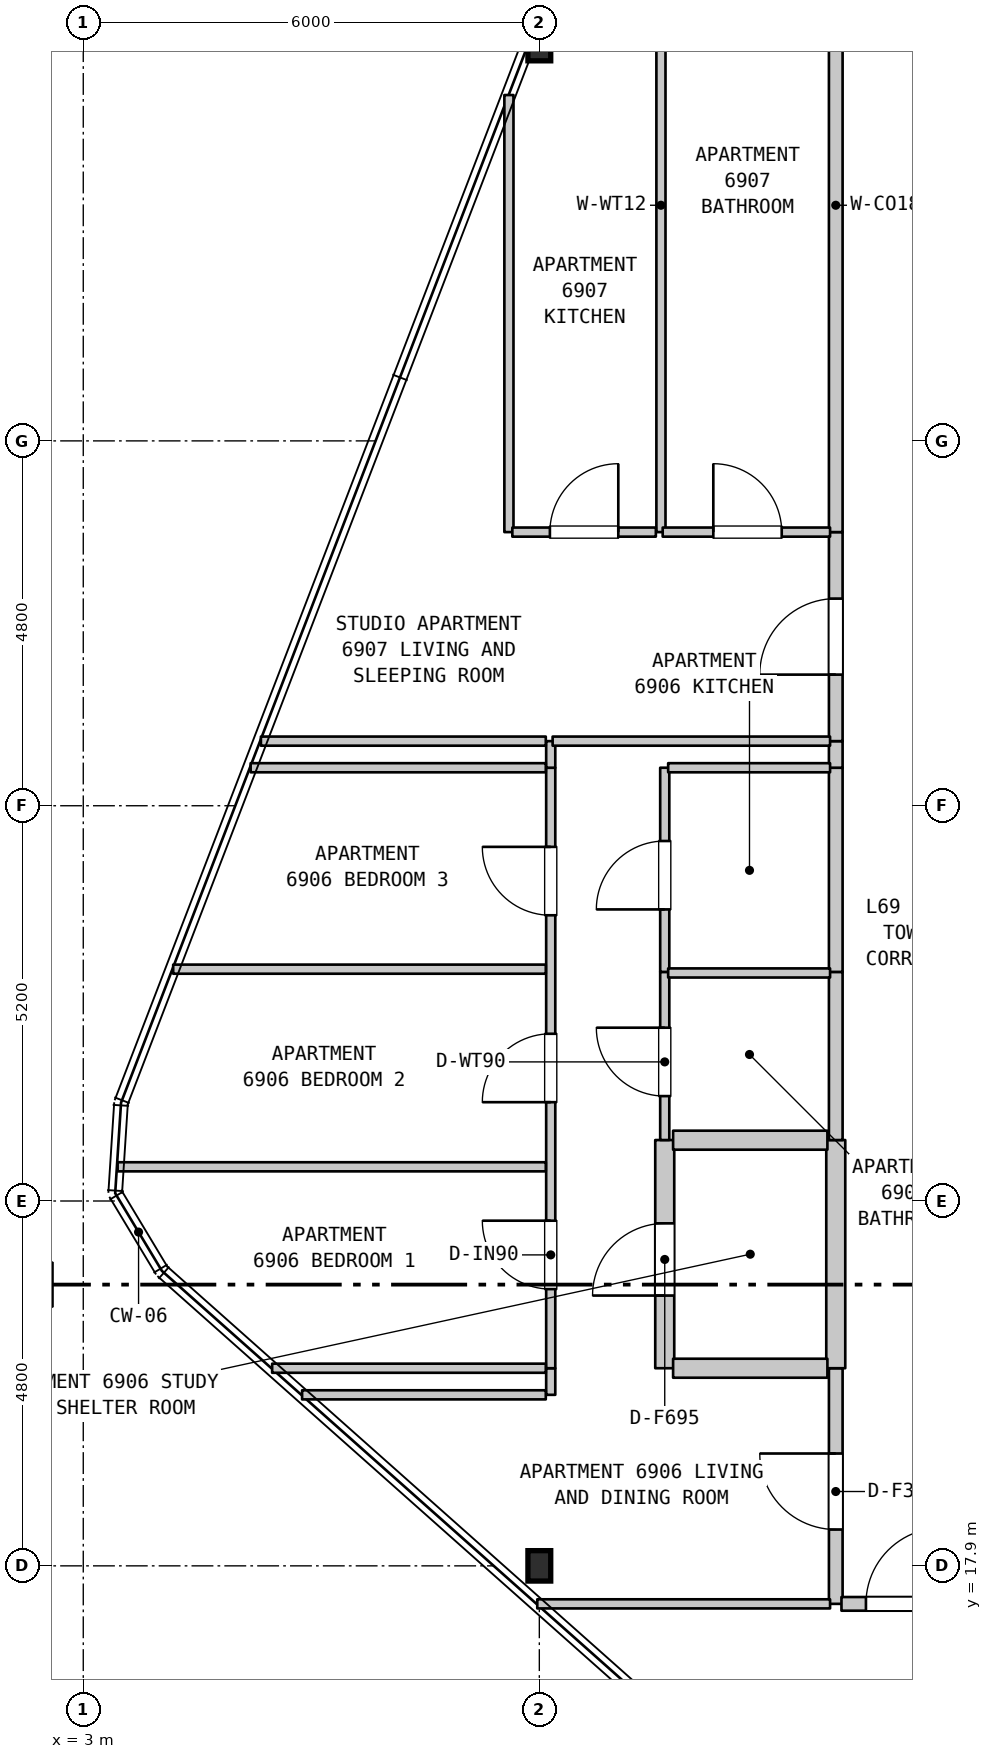
"""IFC4 building model, lengths in metres.
Left out: names, types, materials, properties, quantities, classifications, styles, units other than length and angle.
Written with IfcOpenShell. Run it as: python <this file> out.ifc"""

import sys

from ifc_helpers import new_model, si_unit, direction, frame, frame_2d, origin, origin_2d, place, context, subcontext, project, spatial, rectangle, i_section, extrude, element, fill, save


model = new_model("IFC4")
c1 = context("Model", 3, precision=1e-05, world=origin(), true_north=direction((0.0, 1.0)))
c2 = subcontext(c1, "Body", "Model", "MODEL_VIEW")
j1 = project(units=[si_unit("LENGTHUNIT", "METRE"), si_unit("PLANEANGLEUNIT", "RADIAN")], contexts=[c1])
p1 = place(None, origin())
s1 = spatial("IfcSite", under=j1, at=p1, CompositionType="ELEMENT")
p2 = place(p1, origin())
s2 = spatial("IfcBuilding", under=s1, at=p2, CompositionType="ELEMENT")
p3 = place(p2, frame((0.0, 0.0, 276.9)))
s3 = spatial("IfcBuildingStorey", under=s2, at=p3, CompositionType="ELEMENT", Elevation=276.9)
for number, where, z_axis, x_axis in (
    (1, (9.0, 17.9, 0.0), (0.0, 0.0, 1.0), (1.0, 0.0, 0.0)),
    (2, (9.0, 37.9, 0.0), (0.0, 0.0, 1.0), (1.0, 0.0, 0.0)),
):
    element("IfcColumn", number, at=place(p3, frame(where, z_axis=z_axis, x_axis=x_axis)), inside=s3, PredefinedType="COLUMN", context=c2, shape_type="SweptSolid", body=[
        extrude(i_section(OverallWidth=0.3, OverallDepth=0.4, WebThickness=0.013, FlangeThickness=0.024, FilletRadius=0.027, at=origin_2d()), origin(), (0.0, 0.0, 1.0), 3.7),
    ])
p4 = place(p3, frame((8.6, 31.5, 0.0), z_axis=(0.0, 0.0, 1.0), x_axis=(0.0, 1.0, 0.0)))
e3 = element("IfcWall", 3, at=p4, inside=s3, PredefinedType="PARTITIONING", context=c2, shape_type="SweptSolid", body=[
    extrude(rectangle(XDim=5.75, YDim=0.12, at=frame_2d((2.875, 0.0))), origin(), (0.0, 0.0, 1.0), 3.39),
])
p5 = place(p3, frame((9.15, 20.15, 0.0), z_axis=(0.0, 0.0, 1.0), x_axis=(0.0, 1.0, 0.0)))
e4 = element("IfcWall", 4, at=p5, inside=s3, PredefinedType="PARTITIONING", context=c2, shape_type="SweptSolid", body=[
    extrude(rectangle(XDim=0.35, YDim=0.12, at=frame_2d((0.175, 0.0))), origin(), (0.0, 0.0, 1.0), 3.39),
])
p6 = place(p3, frame((9.15, 20.5, 0.0), z_axis=(0.0, 0.0, 1.0), x_axis=(0.0, 1.0, 0.0)))
e5 = element("IfcWall", 5, at=p6, inside=s3, PredefinedType="PARTITIONING", context=c2, shape_type="SweptSolid", body=[
    extrude(rectangle(XDim=7.9, YDim=0.12, at=frame_2d((3.95, 0.0))), origin(), (0.0, 0.0, 1.0), 2.79),
])
p7 = place(p6, frame((1.041, 0.0, 0.0)))
e6 = element("IfcOpeningElement", 6, at=p7, cuts=e5, PredefinedType="OPENING", context=c2, shape_type="SweptSolid", body=[
    extrude(rectangle(XDim=0.9, YDim=2.15, at=frame_2d((0.45, 1.075))), frame((0.0, 0.07, 0.0), z_axis=(0.0, -1.0, 0.0), x_axis=(1.0, 0.0, 0.0)), (0.0, 0.0, 1.0), 0.14),
])
p8 = place(p6, frame((3.5, 0.0, 0.0)))
e7 = element("IfcOpeningElement", 7, at=p8, cuts=e5, PredefinedType="OPENING", context=c2, shape_type="SweptSolid", body=[
    extrude(rectangle(XDim=0.9, YDim=2.15, at=frame_2d((0.45, 1.075))), frame((0.0, 0.07, 0.0), z_axis=(0.0, -1.0, 0.0), x_axis=(1.0, 0.0, 0.0)), (0.0, 0.0, 1.0), 0.14),
])
p9 = place(p6, frame((5.959, 0.0, 0.0)))
e8 = element("IfcOpeningElement", 8, at=p9, cuts=e5, PredefinedType="OPENING", context=c2, shape_type="SweptSolid", body=[
    extrude(rectangle(XDim=0.9, YDim=2.15, at=frame_2d((0.45, 1.075))), frame((0.0, 0.07, 0.0), z_axis=(0.0, -1.0, 0.0), x_axis=(1.0, 0.0, 0.0)), (0.0, 0.0, 1.0), 0.14),
])
p10 = place(p3, frame((9.15, 28.4, 0.0), z_axis=(0.0, 0.0, 1.0), x_axis=(0.0, 1.0, 0.0)))
e9 = element("IfcWall", 9, at=p10, inside=s3, PredefinedType="PARTITIONING", context=c2, shape_type="SweptSolid", body=[
    extrude(rectangle(XDim=0.35, YDim=0.12, at=frame_2d((0.175, 0.0))), origin(), (0.0, 0.0, 1.0), 3.39),
])
p11 = place(p3, frame((10.6, 31.5, 0.0), z_axis=(0.0, 0.0, 1.0), x_axis=(0.0, 1.0, 0.0)))
e10 = element("IfcWall", 10, at=p11, inside=s3, PredefinedType="PARTITIONING", context=c2, shape_type="SweptSolid", body=[
    extrude(rectangle(XDim=8.6, YDim=0.12, at=frame_2d((4.3, 0.0))), origin(), (0.0, 0.0, 1.0), 3.39),
])
p12 = place(p3, frame((10.65, 20.5, 0.0), z_axis=(0.0, 0.0, 1.0), x_axis=(0.0, 1.0, 0.0)))
e11 = element("IfcWall", 11, at=p12, inside=s3, PredefinedType="STANDARD", context=c2, shape_type="SweptSolid", body=[
    extrude(rectangle(XDim=3.002, YDim=0.25, at=frame_2d((1.501, 0.0))), origin(), (0.0, 0.0, 1.0), 3.39),
])
p13 = place(p12, frame((0.956, 0.0, 0.0)))
e12 = element("IfcOpeningElement", 12, at=p13, cuts=e11, PredefinedType="OPENING", context=c2, shape_type="SweptSolid", body=[
    extrude(rectangle(XDim=0.95, YDim=2.15, at=frame_2d((0.475, 1.075))), frame((0.0, 0.135, 0.0), z_axis=(0.0, -1.0, 0.0), x_axis=(1.0, 0.0, 0.0)), (0.0, 0.0, 1.0), 0.27),
])
p14 = place(p3, frame((10.65, 23.502, 0.0), z_axis=(0.0, 0.0, 1.0), x_axis=(0.0, 1.0, 0.0)))
e13 = element("IfcWall", 13, at=p14, inside=s3, PredefinedType="PARTITIONING", context=c2, shape_type="SweptSolid", body=[
    extrude(rectangle(XDim=2.212, YDim=0.12, at=frame_2d((1.106, 0.0))), origin(), (0.0, 0.0, 1.0), 3.39),
])
p15 = place(p14, frame((0.578, 0.0, 0.0)))
e14 = element("IfcOpeningElement", 14, at=p15, cuts=e13, PredefinedType="OPENING", context=c2, shape_type="SweptSolid", body=[
    extrude(rectangle(XDim=0.9, YDim=2.1, at=frame_2d((0.45, 1.05))), frame((0.0, 0.07, 0.0), z_axis=(0.0, -1.0, 0.0), x_axis=(1.0, 0.0, 0.0)), (0.0, 0.0, 1.0), 0.14),
])
p16 = place(p3, frame((10.65, 25.714, 0.0), z_axis=(0.0, 0.0, 1.0), x_axis=(0.0, 1.0, 0.0)))
e15 = element("IfcWall", 15, at=p16, inside=s3, PredefinedType="PARTITIONING", context=c2, shape_type="SweptSolid", body=[
    extrude(rectangle(XDim=2.686, YDim=0.12, at=frame_2d((1.343, 0.0))), origin(), (0.0, 0.0, 1.0), 3.39),
])
p17 = place(p16, frame((0.822, 0.0, 0.0)))
e16 = element("IfcOpeningElement", 16, at=p17, cuts=e15, PredefinedType="OPENING", context=c2, shape_type="SweptSolid", body=[
    extrude(rectangle(XDim=0.9, YDim=2.15, at=frame_2d((0.45, 1.075))), frame((0.0, 0.07, 0.0), z_axis=(0.0, -1.0, 0.0), x_axis=(1.0, 0.0, 0.0)), (0.0, 0.0, 1.0), 0.14),
])
p18 = place(p3, frame((12.9, 17.4, 0.0), z_axis=(0.0, 0.0, 1.0), x_axis=(0.0, 1.0, 0.0)))
e17 = element("IfcWall", 17, at=p18, inside=s3, PredefinedType="STANDARD", context=c2, shape_type="SweptSolid", body=[
    extrude(rectangle(XDim=3.1, YDim=0.18, at=frame_2d((1.55, 0.0))), origin(), (0.0, 0.0, 1.0), 3.39),
])
p19 = place(p18, frame((0.978, 0.0, 0.0)))
e18 = element("IfcOpeningElement", 18, at=p19, cuts=e17, PredefinedType="OPENING", context=c2, shape_type="SweptSolid", body=[
    extrude(rectangle(XDim=1.0, YDim=2.15, at=frame_2d((0.5, 1.075))), frame((0.0, 0.1, 0.0), z_axis=(0.0, -1.0, 0.0), x_axis=(1.0, 0.0, 0.0)), (0.0, 0.0, 1.0), 0.2),
])
p20 = place(p3, frame((12.9, 20.5, 0.0), z_axis=(0.0, 0.0, 1.0), x_axis=(0.0, 1.0, 0.0)))
e19 = element("IfcWall", 19, at=p20, inside=s3, PredefinedType="STANDARD", context=c2, shape_type="SweptSolid", body=[
    extrude(rectangle(XDim=3.002, YDim=0.25, at=frame_2d((1.501, 0.0))), origin(), (0.0, 0.0, 1.0), 3.39),
])
p21 = place(p3, frame((12.9, 23.502, 0.0), z_axis=(0.0, 0.0, 1.0), x_axis=(0.0, 1.0, 0.0)))
e20 = element("IfcWall", 20, at=p21, inside=s3, PredefinedType="STANDARD", context=c2, shape_type="SweptSolid", body=[
    extrude(rectangle(XDim=2.212, YDim=0.18, at=frame_2d((1.106, 0.0))), origin(), (0.0, 0.0, 1.0), 3.39),
])
p22 = place(p3, frame((12.9, 25.714, 0.0), z_axis=(0.0, 0.0, 1.0), x_axis=(0.0, 1.0, 0.0)))
e21 = element("IfcWall", 21, at=p22, inside=s3, PredefinedType="STANDARD", context=c2, shape_type="SweptSolid", body=[
    extrude(rectangle(XDim=2.686, YDim=0.18, at=frame_2d((1.343, 0.0))), origin(), (0.0, 0.0, 1.0), 3.39),
])
p23 = place(p3, frame((12.9, 28.4, 0.0), z_axis=(0.0, 0.0, 1.0), x_axis=(0.0, 1.0, 0.0)))
e22 = element("IfcWall", 22, at=p23, inside=s3, PredefinedType="STANDARD", context=c2, shape_type="SweptSolid", body=[
    extrude(rectangle(XDim=0.35, YDim=0.18, at=frame_2d((0.175, 0.0))), origin(), (0.0, 0.0, 1.0), 3.39),
])
p24 = place(p3, frame((12.9, 28.75, 0.0), z_axis=(0.0, 0.0, 1.0), x_axis=(0.0, 1.0, 0.0)))
e23 = element("IfcWall", 23, at=p24, inside=s3, PredefinedType="STANDARD", context=c2, shape_type="SweptSolid", body=[
    extrude(rectangle(XDim=2.75, YDim=0.18, at=frame_2d((1.375, 0.0))), origin(), (0.0, 0.0, 1.0), 3.39),
])
p25 = place(p24, frame((0.875, 0.0, 0.0)))
e24 = element("IfcOpeningElement", 24, at=p25, cuts=e23, PredefinedType="OPENING", context=c2, shape_type="SweptSolid", body=[
    extrude(rectangle(XDim=1.0, YDim=2.15, at=frame_2d((0.5, 1.075))), frame((0.0, 0.1, 0.0), z_axis=(0.0, -1.0, 0.0), x_axis=(1.0, 0.0, 0.0)), (0.0, 0.0, 1.0), 0.2),
])
p26 = place(p3, frame((12.9, 31.5, 0.0), z_axis=(0.0, 0.0, 1.0), x_axis=(0.0, 1.0, 0.0)))
e25 = element("IfcWall", 25, at=p26, inside=s3, PredefinedType="STANDARD", context=c2, shape_type="SweptSolid", body=[
    extrude(rectangle(XDim=8.6, YDim=0.18, at=frame_2d((4.3, 0.0))), origin(), (0.0, 0.0, 1.0), 3.39),
])
p27 = place(p3, frame((8.973, 17.4, 0.0), z_axis=(0.0, 0.0, 1.0), x_axis=(1.0, 0.0, 0.0)))
e26 = element("IfcWall", 26, at=p27, inside=s3, PredefinedType="PARTITIONING", context=c2, shape_type="SweptSolid", body=[
    extrude(rectangle(XDim=3.852, YDim=0.12, at=frame_2d((1.926, 0.0))), origin(), (0.0, 0.0, 1.0), 3.39),
])
p28 = place(p3, frame((12.975, 17.4, 0.0), z_axis=(0.0, 0.0, 1.0), x_axis=(1.0, 0.0, 0.0)))
e27 = element("IfcWall", 27, at=p28, inside=s3, PredefinedType="STANDARD", context=c2, shape_type="SweptSolid", body=[
    extrude(rectangle(XDim=3.68, YDim=0.18, at=frame_2d((1.84, 0.0))), origin(), (0.0, 0.0, 1.0), 3.39),
])
p29 = place(p28, frame((0.322, 0.0, 0.0)))
e28 = element("IfcOpeningElement", 28, at=p29, cuts=e27, PredefinedType="OPENING", context=c2, shape_type="SweptSolid", body=[
    extrude(rectangle(XDim=1.0, YDim=2.15, at=frame_2d((0.5, 1.075))), frame((0.0, 0.1, 0.0), z_axis=(0.0, -1.0, 0.0), x_axis=(1.0, 0.0, 0.0)), (0.0, 0.0, 1.0), 0.2),
])
p30 = place(p3, frame((5.879, 20.15, 0.0), z_axis=(0.0, 0.0, 1.0), x_axis=(1.0, 0.0, 0.0)))
e29 = element("IfcWall", 29, at=p30, inside=s3, PredefinedType="PARTITIONING", context=c2, shape_type="SweptSolid", body=[
    extrude(rectangle(XDim=3.206, YDim=0.12, at=frame_2d((1.603, 0.0))), origin(), (0.0, 0.0, 1.0), 3.39),
])
p31 = place(p3, frame((5.485, 20.5, 0.0), z_axis=(0.0, 0.0, 1.0), x_axis=(1.0, 0.0, 0.0)))
e30 = element("IfcWall", 30, at=p31, inside=s3, PredefinedType="PARTITIONING", context=c2, shape_type="SweptSolid", body=[
    extrude(rectangle(XDim=3.6, YDim=0.12, at=frame_2d((1.8, 0.0))), origin(), (0.0, 0.0, 1.0), 3.39),
])
p32 = place(p3, frame((10.76, 20.5, 0.0), z_axis=(0.0, 0.0, 1.0), x_axis=(1.0, 0.0, 0.0)))
e31 = element("IfcWall", 31, at=p32, inside=s3, PredefinedType="STANDARD", context=c2, shape_type="SweptSolid", body=[
    extrude(rectangle(XDim=2.03, YDim=0.25, at=frame_2d((1.015, 0.0))), origin(), (0.0, 0.0, 1.0), 3.39),
])
p33 = place(p3, frame((3.452, 23.15, 0.0), z_axis=(0.0, 0.0, 1.0), x_axis=(1.0, 0.0, 0.0)))
e32 = element("IfcWall", 32, at=p33, inside=s3, PredefinedType="PARTITIONING", context=c2, shape_type="SweptSolid", body=[
    extrude(rectangle(XDim=5.633, YDim=0.12, at=frame_2d((2.816, 0.0))), origin(), (0.0, 0.0, 1.0), 3.39),
])
p34 = place(p3, frame((10.76, 23.5, 0.0), z_axis=(0.0, 0.0, 1.0), x_axis=(1.0, 0.0, 0.0)))
e33 = element("IfcWall", 33, at=p34, inside=s3, PredefinedType="STANDARD", context=c2, shape_type="SweptSolid", body=[
    extrude(rectangle(XDim=2.03, YDim=0.25, at=frame_2d((1.015, 0.0))), origin(), (0.0, 0.0, 1.0), 3.39),
])
p35 = place(p3, frame((10.695, 25.7, 0.0), z_axis=(0.0, 0.0, 1.0), x_axis=(1.0, 0.0, 0.0)))
e34 = element("IfcWall", 34, at=p35, inside=s3, PredefinedType="PARTITIONING", context=c2, shape_type="SweptSolid", body=[
    extrude(rectangle(XDim=2.13, YDim=0.12, at=frame_2d((1.065, 0.0))), origin(), (0.0, 0.0, 1.0), 3.39),
])
p36 = place(p3, frame((4.183, 25.75, 0.0), z_axis=(0.0, 0.0, 1.0), x_axis=(1.0, 0.0, 0.0)))
e35 = element("IfcWall", 35, at=p36, inside=s3, PredefinedType="PARTITIONING", context=c2, shape_type="SweptSolid", body=[
    extrude(rectangle(XDim=4.902, YDim=0.12, at=frame_2d((2.451, 0.0))), origin(), (0.0, 0.0, 1.0), 3.39),
])
p37 = place(p3, frame((5.202, 28.4, 0.0), z_axis=(0.0, 0.0, 1.0), x_axis=(1.0, 0.0, 0.0)))
e36 = element("IfcWall", 36, at=p37, inside=s3, PredefinedType="PARTITIONING", context=c2, shape_type="SweptSolid", body=[
    extrude(rectangle(XDim=3.883, YDim=0.12, at=frame_2d((1.941, 0.0))), origin(), (0.0, 0.0, 1.0), 3.39),
])
p38 = place(p3, frame((10.695, 28.4, 0.0), z_axis=(0.0, 0.0, 1.0), x_axis=(1.0, 0.0, 0.0)))
e37 = element("IfcWall", 37, at=p38, inside=s3, PredefinedType="PARTITIONING", context=c2, shape_type="SweptSolid", body=[
    extrude(rectangle(XDim=2.13, YDim=0.12, at=frame_2d((1.065, 0.0))), origin(), (0.0, 0.0, 1.0), 3.39),
])
p39 = place(p3, frame((5.337, 28.75, 0.0), z_axis=(0.0, 0.0, 1.0), x_axis=(1.0, 0.0, 0.0)))
e38 = element("IfcWall", 38, at=p39, inside=s3, PredefinedType="PARTITIONING", context=c2, shape_type="SweptSolid", body=[
    extrude(rectangle(XDim=3.748, YDim=0.12, at=frame_2d((1.874, 0.0))), origin(), (0.0, 0.0, 1.0), 3.39),
])
p40 = place(p3, frame((9.175, 28.75, 0.0), z_axis=(0.0, 0.0, 1.0), x_axis=(1.0, 0.0, 0.0)))
e39 = element("IfcWall", 39, at=p40, inside=s3, PredefinedType="PARTITIONING", context=c2, shape_type="SweptSolid", body=[
    extrude(rectangle(XDim=3.65, YDim=0.12, at=frame_2d((1.825, 0.0))), origin(), (0.0, 0.0, 1.0), 3.39),
])
p41 = place(p3, frame((8.645, 31.5, 0.0), z_axis=(0.0, 0.0, 1.0), x_axis=(1.0, 0.0, 0.0)))
e40 = element("IfcWall", 40, at=p41, inside=s3, PredefinedType="PARTITIONING", context=c2, shape_type="SweptSolid", body=[
    extrude(rectangle(XDim=1.888, YDim=0.12, at=frame_2d((0.944, 0.0))), origin(), (0.0, 0.0, 1.0), 3.39),
])
p42 = place(p41, frame((0.494, 0.0, 0.0)))
e41 = element("IfcOpeningElement", 41, at=p42, cuts=e40, PredefinedType="OPENING", context=c2, shape_type="SweptSolid", body=[
    extrude(rectangle(XDim=0.9, YDim=2.15, at=frame_2d((0.45, 1.075))), frame((0.0, 0.07, 0.0), z_axis=(0.0, -1.0, 0.0), x_axis=(1.0, 0.0, 0.0)), (0.0, 0.0, 1.0), 0.14),
])
p43 = place(p3, frame((10.623, 31.5, 0.0), z_axis=(0.0, 0.0, 1.0), x_axis=(1.0, 0.0, 0.0)))
e42 = element("IfcWall", 42, at=p43, inside=s3, PredefinedType="PARTITIONING", context=c2, shape_type="SweptSolid", body=[
    extrude(rectangle(XDim=2.202, YDim=0.12, at=frame_2d((1.101, 0.0))), origin(), (0.0, 0.0, 1.0), 3.39),
])
p44 = place(p43, frame((0.666, 0.0, 0.0)))
e43 = element("IfcOpeningElement", 43, at=p44, cuts=e42, PredefinedType="OPENING", context=c2, shape_type="SweptSolid", body=[
    extrude(rectangle(XDim=0.9, YDim=2.1, at=frame_2d((0.45, 1.05))), frame((0.0, 0.07, 0.0), z_axis=(0.0, -1.0, 0.0), x_axis=(1.0, 0.0, 0.0)), (0.0, 0.0, 1.0), 0.14),
])
p45 = place(p7, origin())
e44 = element("IfcDoor", 44, at=p45, inside=s3, OperationType="SINGLE_SWING_RIGHT", PredefinedType="DOOR", context=c2, shape_type="SweptSolid", body=[
    extrude(rectangle(XDim=0.9, YDim=2.15, at=frame_2d((0.45, 1.075))), frame((0.0, 0.025, 0.0), z_axis=(0.0, -1.0, 0.0), x_axis=(1.0, 0.0, 0.0)), (0.0, 0.0, 1.0), 0.05),
])
fill(e6, e44)
p46 = place(p8, origin())
e45 = element("IfcDoor", 45, at=p46, inside=s3, OperationType="SINGLE_SWING_LEFT", PredefinedType="DOOR", context=c2, shape_type="SweptSolid", body=[
    extrude(rectangle(XDim=0.9, YDim=2.15, at=frame_2d((0.45, 1.075))), frame((0.0, 0.025, 0.0), z_axis=(0.0, -1.0, 0.0), x_axis=(1.0, 0.0, 0.0)), (0.0, 0.0, 1.0), 0.05),
])
fill(e7, e45)
p47 = place(p9, origin())
e46 = element("IfcDoor", 46, at=p47, inside=s3, OperationType="SINGLE_SWING_RIGHT", PredefinedType="DOOR", context=c2, shape_type="SweptSolid", body=[
    extrude(rectangle(XDim=0.9, YDim=2.15, at=frame_2d((0.45, 1.075))), frame((0.0, 0.025, 0.0), z_axis=(0.0, -1.0, 0.0), x_axis=(1.0, 0.0, 0.0)), (0.0, 0.0, 1.0), 0.05),
])
fill(e8, e46)
p48 = place(p13, origin())
e47 = element("IfcDoor", 47, at=p48, inside=s3, OperationType="SINGLE_SWING_LEFT", PredefinedType="DOOR", context=c2, shape_type="SweptSolid", body=[
    extrude(rectangle(XDim=0.95, YDim=2.15, at=frame_2d((0.475, 1.075))), frame((0.0, 0.025, 0.0), z_axis=(0.0, -1.0, 0.0), x_axis=(1.0, 0.0, 0.0)), (0.0, 0.0, 1.0), 0.05),
])
fill(e12, e47)
p49 = place(p15, origin())
e48 = element("IfcDoor", 48, at=p49, inside=s3, OperationType="SINGLE_SWING_RIGHT", PredefinedType="DOOR", context=c2, shape_type="SweptSolid", body=[
    extrude(rectangle(XDim=0.9, YDim=2.1, at=frame_2d((0.45, 1.05))), frame((0.0, 0.025, 0.0), z_axis=(0.0, -1.0, 0.0), x_axis=(1.0, 0.0, 0.0)), (0.0, 0.0, 1.0), 0.05),
])
fill(e14, e48)
p50 = place(p17, origin())
e49 = element("IfcDoor", 49, at=p50, inside=s3, OperationType="SINGLE_SWING_LEFT", PredefinedType="DOOR", context=c2, shape_type="SweptSolid", body=[
    extrude(rectangle(XDim=0.9, YDim=2.15, at=frame_2d((0.45, 1.075))), frame((0.0, 0.025, 0.0), z_axis=(0.0, -1.0, 0.0), x_axis=(1.0, 0.0, 0.0)), (0.0, 0.0, 1.0), 0.05),
])
fill(e16, e49)
p51 = place(p19, origin())
e50 = element("IfcDoor", 50, at=p51, inside=s3, OperationType="SINGLE_SWING_RIGHT", PredefinedType="DOOR", context=c2, shape_type="SweptSolid", body=[
    extrude(rectangle(XDim=1.0, YDim=2.15, at=frame_2d((0.5, 1.075))), frame((0.0, 0.025, 0.0), z_axis=(0.0, -1.0, 0.0), x_axis=(1.0, 0.0, 0.0)), (0.0, 0.0, 1.0), 0.05),
])
fill(e18, e50)
p52 = place(p25, origin())
e51 = element("IfcDoor", 51, at=p52, inside=s3, OperationType="SINGLE_SWING_LEFT", PredefinedType="DOOR", context=c2, shape_type="SweptSolid", body=[
    extrude(rectangle(XDim=1.0, YDim=2.15, at=frame_2d((0.5, 1.075))), frame((0.0, 0.025, 0.0), z_axis=(0.0, -1.0, 0.0), x_axis=(1.0, 0.0, 0.0)), (0.0, 0.0, 1.0), 0.05),
])
fill(e24, e51)
p53 = place(p29, origin())
e52 = element("IfcDoor", 52, at=p53, inside=s3, OperationType="SINGLE_SWING_RIGHT", PredefinedType="DOOR", context=c2, shape_type="SweptSolid", body=[
    extrude(rectangle(XDim=1.0, YDim=2.15, at=frame_2d((0.5, 1.075))), frame((0.0, 0.025, 0.0), z_axis=(0.0, -1.0, 0.0), x_axis=(1.0, 0.0, 0.0)), (0.0, 0.0, 1.0), 0.05),
])
fill(e28, e52)
p54 = place(p42, origin())
e53 = element("IfcDoor", 53, at=p54, inside=s3, OperationType="SINGLE_SWING_RIGHT", PredefinedType="DOOR", context=c2, shape_type="SweptSolid", body=[
    extrude(rectangle(XDim=0.9, YDim=2.15, at=frame_2d((0.45, 1.075))), frame((0.0, 0.025, 0.0), z_axis=(0.0, -1.0, 0.0), x_axis=(1.0, 0.0, 0.0)), (0.0, 0.0, 1.0), 0.05),
])
fill(e41, e53)
p55 = place(p44, origin())
e54 = element("IfcDoor", 54, at=p55, inside=s3, OperationType="SINGLE_SWING_LEFT", PredefinedType="DOOR", context=c2, shape_type="SweptSolid", body=[
    extrude(rectangle(XDim=0.9, YDim=2.1, at=frame_2d((0.45, 1.05))), frame((0.0, 0.025, 0.0), z_axis=(0.0, -1.0, 0.0), x_axis=(1.0, 0.0, 0.0)), (0.0, 0.0, 1.0), 0.05),
])
fill(e43, e54)
save(model, sys.argv[1])
